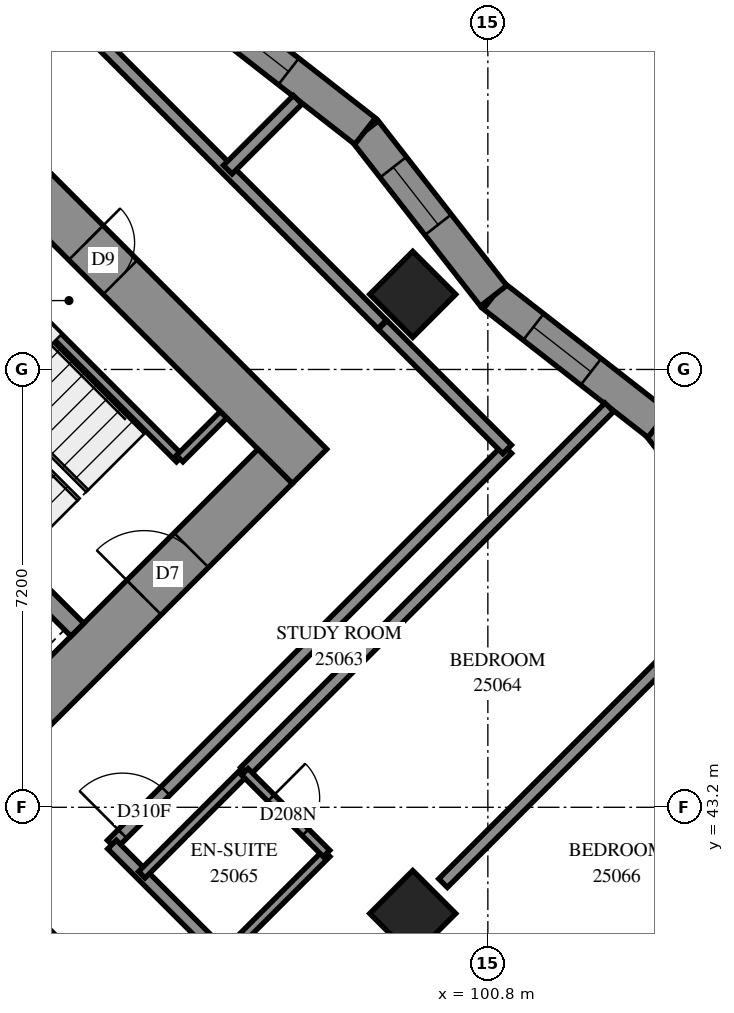
"""IFC4 building model, lengths in metres.
Left out: names, types, materials, properties, quantities, classifications, styles, units other than length and angle.
Written with IfcOpenShell. Run it as: python <this file> out.ifc"""

import sys

from ifc_helpers import new_model, si_unit, direction, frame, frame_2d, origin, origin_2d, place, context, subcontext, project, spatial, polyline, rectangle, outline, extrude, element, fill, save


model = new_model("IFC4")
c1 = context("Model", 3, precision=1e-05, world=origin(), true_north=direction((0.0, 1.0)))
c2 = subcontext(c1, "Body", "Model", "MODEL_VIEW")
j1 = project(units=[si_unit("LENGTHUNIT", "METRE"), si_unit("PLANEANGLEUNIT", "RADIAN")], contexts=[c1])
p1 = place(None, origin())
s1 = spatial("IfcSite", under=j1, at=p1, CompositionType="ELEMENT")
p2 = place(p1, origin())
s2 = spatial("IfcBuilding", under=s1, at=p2, CompositionType="ELEMENT")
p3 = place(p2, frame((0.0, 0.0, 94.8)))
s3 = spatial("IfcBuildingStorey", under=s2, at=p3, CompositionType="ELEMENT", Elevation=94.8)
for number, where, z_axis, x_axis in (
    (1, (99.565, 51.635, 0.0), (0.0, 0.0, 1.0), (0.707, -0.707, 0.0)),
    (2, (99.565, 41.453, 0.0), (0.0, 0.0, 1.0), (0.707, -0.707, 0.0)),
):
    element("IfcColumn", number, at=place(p3, frame(where, z_axis=z_axis, x_axis=x_axis)), inside=s3, PredefinedType="COLUMN", context=c2, shape_type="SweptSolid", body=[
        extrude(rectangle(XDim=1.0, YDim=1.0, at=origin_2d()), origin(), (0.0, 0.0, 1.0), 3.1),
    ])
p4 = place(p3, frame((86.554, 60.121, -0.3), z_axis=(0.0, 0.0, 1.0), x_axis=(0.7071067812, -0.7071067812, 0.0)))
e3 = element("IfcWall", 3, at=p4, inside=s3, PredefinedType="SHEAR", context=c2, shape_type="SweptSolid", body=[
    extrude(rectangle(XDim=16.0, YDim=0.8, at=frame_2d((8.0, 0.0))), origin(), (0.0, 0.0, 1.0), 2.7),
])
p5 = place(p4, frame((10.8, 0.0, 0.3)))
e4 = element("IfcOpeningElement", 4, at=p5, cuts=e3, PredefinedType="OPENING", context=c2, shape_type="SweptSolid", body=[
    extrude(rectangle(XDim=0.8, YDim=2.1, at=frame_2d((0.4, 1.05))), frame((0.0, 0.41, 0.0), z_axis=(0.0, -1.0, 0.0), x_axis=(1.0, 0.0, 0.0)), (0.0, 0.0, 1.0), 0.82),
])
p6 = place(p3, frame((87.12, 38.625, -0.3), z_axis=(0.0, 0.0, 1.0), x_axis=(0.7071067812, 0.7071067812, 0.0)))
e5 = element("IfcWall", 5, at=p6, inside=s3, PredefinedType="SHEAR", context=c2, shape_type="SweptSolid", body=[
    extrude(rectangle(XDim=14.4, YDim=0.8, at=frame_2d((7.2, 0.0))), origin(), (0.0, 0.0, 1.0), 2.7),
])
p7 = place(p6, frame((4.55, 0.0, 0.3)))
e6 = element("IfcOpeningElement", 6, at=p7, cuts=e5, PredefinedType="OPENING", context=c2, shape_type="SweptSolid", body=[
    extrude(rectangle(XDim=1.1, YDim=2.1, at=frame_2d((0.55, 1.05))), frame((0.0, 0.41, 0.0), z_axis=(0.0, -1.0, 0.0), x_axis=(1.0, 0.0, 0.0)), (0.0, 0.0, 1.0), 0.82),
])
p8 = place(p6, frame((11.35, 0.0, 0.3)))
e7 = element("IfcOpeningElement", 7, at=p8, cuts=e5, PredefinedType="OPENING", context=c2, shape_type="SweptSolid", body=[
    extrude(rectangle(XDim=1.1, YDim=2.1, at=frame_2d((0.55, 1.05))), frame((0.0, 0.41, 0.0), z_axis=(0.0, -1.0, 0.0), x_axis=(1.0, 0.0, 0.0)), (0.0, 0.0, 1.0), 0.82),
])
p9 = place(p3, frame((88.958, 51.211, 0.0), z_axis=(0.0, 0.0, 1.0), x_axis=(0.7070998367, -0.7071137256, 0.0)))
e8 = element("IfcWall", 8, at=p9, inside=s3, PredefinedType="SOLIDWALL", context=c2, shape_type="SweptSolid", body=[
    extrude(rectangle(XDim=7.2, YDim=0.3, at=frame_2d((3.6, 0.0))), origin(), (0.0, 0.0, 1.0), 3.1),
])
p10 = place(p3, frame((105.715, 46.791, 0.0), z_axis=(0.0, 0.0, 1.0), x_axis=(-0.6150788643, 0.7884655926, 0.0)))
e9 = element("IfcWall", 9, at=p10, inside=s3, PredefinedType="SOLIDWALL", context=c2, shape_type="SweptSolid", body=[
    extrude(outline(polyline([(0.034, -0.275), (3.468, -0.275), (3.401, 0.275), (-0.034, 0.275), (0.034, -0.275)])), origin(), (0.0, 0.0, 1.0), 3.1),
])
p11 = place(p10, frame((1.29, 0.0, 0.5)))
e10 = element("IfcOpeningElement", 10, at=p11, cuts=e9, PredefinedType="OPENING", context=c2, shape_type="SweptSolid", body=[
    extrude(rectangle(XDim=1.2, YDim=2.45, at=frame_2d((0.6, 1.225))), frame((0.0, 0.285, 0.0), z_axis=(0.0, -1.0, 0.0), x_axis=(1.0, 0.0, 0.0)), (0.0, 0.0, 1.0), 0.57),
])
p12 = place(p3, frame((103.602, 49.499, 0.0), z_axis=(0.0, 0.0, 1.0), x_axis=(-0.788454577, 0.6150929849, 0.0)))
e11 = element("IfcWall", 11, at=p12, inside=s3, PredefinedType="SOLIDWALL", context=c2, shape_type="SweptSolid", body=[
    extrude(outline(polyline([(-0.034, -0.275), (3.401, -0.275), (3.468, 0.275), (0.034, 0.275), (-0.034, -0.275)])), origin(), (0.0, 0.0, 1.0), 3.1),
])
p13 = place(p12, frame((1.403, 0.0, 0.5)))
e12 = element("IfcOpeningElement", 12, at=p13, cuts=e11, PredefinedType="OPENING", context=c2, shape_type="SweptSolid", body=[
    extrude(rectangle(XDim=1.2, YDim=2.45, at=frame_2d((0.6, 1.225))), frame((0.0, 0.285, 0.0), z_axis=(0.0, -1.0, 0.0), x_axis=(1.0, 0.0, 0.0)), (0.0, 0.0, 1.0), 0.57),
])
p14 = place(p3, frame((100.894, 51.611, 0.0), z_axis=(0.0, 0.0, 1.0), x_axis=(-0.6150929849, 0.788454577, 0.0)))
e13 = element("IfcWall", 13, at=p14, inside=s3, PredefinedType="SOLIDWALL", context=c2, shape_type="SweptSolid", body=[
    extrude(outline(polyline([(0.034, -0.275), (3.468, -0.275), (3.401, 0.275), (-0.034, 0.275), (0.034, -0.275)])), origin(), (0.0, 0.0, 1.0), 3.1),
])
p15 = place(p14, frame((1.482, 0.0, 0.5)))
e14 = element("IfcOpeningElement", 14, at=p15, cuts=e13, PredefinedType="OPENING", context=c2, shape_type="SweptSolid", body=[
    extrude(rectangle(XDim=1.2, YDim=2.45, at=frame_2d((0.6, 1.225))), frame((0.0, 0.285, 0.0), z_axis=(0.0, -1.0, 0.0), x_axis=(1.0, 0.0, 0.0)), (0.0, 0.0, 1.0), 0.57),
])
p16 = place(p3, frame((98.782, 54.319, 0.0), z_axis=(0.0, 0.0, 1.0), x_axis=(-0.7884655926, 0.6150788643, 0.0)))
e15 = element("IfcWall", 15, at=p16, inside=s3, PredefinedType="SOLIDWALL", context=c2, shape_type="SweptSolid", body=[
    extrude(outline(polyline([(-0.034, -0.275), (3.401, -0.275), (3.468, 0.275), (0.034, 0.275), (-0.034, -0.275)])), origin(), (0.0, 0.0, 1.0), 3.1),
])
p17 = place(p16, frame((1.596, 0.0, 0.5)))
e16 = element("IfcOpeningElement", 16, at=p17, cuts=e15, PredefinedType="OPENING", context=c2, shape_type="SweptSolid", body=[
    extrude(rectangle(XDim=1.2, YDim=2.45, at=frame_2d((0.6, 1.225))), frame((0.0, 0.285, 0.0), z_axis=(0.0, -1.0, 0.0), x_axis=(1.0, 0.0, 0.0)), (0.0, 0.0, 1.0), 0.57),
])
p18 = place(p3, frame((91.313, 53.354, 0.0), z_axis=(0.0, 0.0, 1.0), x_axis=(0.7071147811, -0.7070987812, 0.0)))
e17 = element("IfcWall", 17, at=p18, inside=s3, PredefinedType="PARTITIONING", context=c2, shape_type="SweptSolid", body=[
    extrude(rectangle(XDim=6.25, YDim=0.15, at=frame_2d((3.125, 0.0))), origin(), (0.0, 0.0, 1.0), 3.1),
])
p19 = place(p3, frame((95.732, 48.934, 0.0), z_axis=(0.0, 0.0, 1.0), x_axis=(0.7071067812, 0.7071067812, 0.0)))
e18 = element("IfcWall", 18, at=p19, inside=s3, PredefinedType="PARTITIONING", context=c2, shape_type="SweptSolid", body=[
    extrude(rectangle(XDim=1.02, YDim=0.15, at=frame_2d((0.51, 0.0))), origin(), (0.0, 0.0, 1.0), 3.1),
])
p20 = place(p3, frame((93.339, 41.309, 0.0), z_axis=(0.0, 0.0, 1.0), x_axis=(0.7071067812, -0.7071067812, 0.0)))
e19 = element("IfcWall", 19, at=p20, inside=s3, PredefinedType="PARTITIONING", context=c2, shape_type="SweptSolid", body=[
    extrude(rectangle(XDim=18.702, YDim=0.2, at=frame_2d((9.351, 0.0))), origin(), (0.0, 0.0, 1.0), 3.1),
])
p21 = place(p20, frame((3.05, 0.0, 0.0)))
e20 = element("IfcOpeningElement", 20, at=p21, cuts=e19, PredefinedType="OPENING", context=c2, shape_type="SweptSolid", body=[
    extrude(rectangle(XDim=0.9, YDim=2.1, at=frame_2d((0.45, 1.05))), frame((0.0, 0.11, 0.0), z_axis=(0.0, -1.0, 0.0), x_axis=(1.0, 0.0, 0.0)), (0.0, 0.0, 1.0), 0.22),
])
p22 = place(p20, frame((4.7, 0.0, 0.0)))
e21 = element("IfcOpeningElement", 21, at=p22, cuts=e19, PredefinedType="OPENING", context=c2, shape_type="SweptSolid", body=[
    extrude(rectangle(XDim=0.9, YDim=2.1, at=frame_2d((0.45, 1.05))), frame((0.0, 0.11, 0.0), z_axis=(0.0, -1.0, 0.0), x_axis=(1.0, 0.0, 0.0)), (0.0, 0.0, 1.0), 0.22),
])
p23 = place(p20, frame((10.149, 0.0, 0.0)))
e22 = element("IfcOpeningElement", 22, at=p23, cuts=e19, PredefinedType="OPENING", context=c2, shape_type="SweptSolid", body=[
    extrude(rectangle(XDim=0.9, YDim=2.1, at=frame_2d((0.45, 1.05))), frame((0.0, 0.11, 0.0), z_axis=(0.0, -1.0, 0.0), x_axis=(1.0, 0.0, 0.0)), (0.0, 0.0, 1.0), 0.22),
])
p24 = place(p20, frame((11.9, 0.0, 0.0)))
e23 = element("IfcOpeningElement", 23, at=p24, cuts=e19, PredefinedType="OPENING", context=c2, shape_type="SweptSolid", body=[
    extrude(rectangle(XDim=0.9, YDim=2.1, at=frame_2d((0.45, 1.05))), frame((0.0, 0.11, 0.0), z_axis=(0.0, -1.0, 0.0), x_axis=(1.0, 0.0, 0.0)), (0.0, 0.0, 1.0), 0.22),
])
p25 = place(p20, frame((17.45, 0.0, 0.0)))
e24 = element("IfcOpeningElement", 24, at=p25, cuts=e19, PredefinedType="OPENING", context=c2, shape_type="SweptSolid", body=[
    extrude(rectangle(XDim=0.9, YDim=2.1, at=frame_2d((0.45, 1.05))), frame((0.0, 0.11, 0.0), z_axis=(0.0, -1.0, 0.0), x_axis=(1.0, 0.0, 0.0)), (0.0, 0.0, 1.0), 0.22),
])
p26 = place(p3, frame((94.615, 42.587, 0.0), z_axis=(0.0, 0.0, 1.0), x_axis=(0.7071067812, 0.7071067812, 0.0)))
e25 = element("IfcWall", 25, at=p26, inside=s3, PredefinedType="PARTITIONING", context=c2, shape_type="SweptSolid", body=[
    extrude(rectangle(XDim=9.198, YDim=0.2, at=frame_2d((4.599, 0.0))), origin(), (0.0, 0.0, 1.0), 3.1),
])
p27 = place(p26, frame((0.248, 0.0, 0.0)))
e26 = element("IfcOpeningElement", 26, at=p27, cuts=e25, PredefinedType="OPENING", context=c2, shape_type="SweptSolid", body=[
    extrude(rectangle(XDim=1.0, YDim=2.1, at=frame_2d((0.5, 1.05))), frame((0.0, 0.11, 0.0), z_axis=(0.0, -1.0, 0.0), x_axis=(1.0, 0.0, 0.0)), (0.0, 0.0, 1.0), 0.22),
])
p28 = place(p3, frame((101.896, 38.698, 0.0), z_axis=(0.0, 0.0, 1.0), x_axis=(0.7072241589, 0.706989384, 0.0)))
e27 = element("IfcWall", 27, at=p28, inside=s3, PredefinedType="PARTITIONING", context=c2, shape_type="SweptSolid", body=[
    extrude(rectangle(XDim=8.519, YDim=0.2, at=frame_2d((4.259, 0.0))), origin(), (0.0, 0.0, 1.0), 3.1),
])
p29 = place(p3, frame((96.805, 43.787, 0.0), z_axis=(0.0, 0.0, 1.0), x_axis=(0.7071126822, 0.7071008801, 0.0)))
e28 = element("IfcWall", 28, at=p29, inside=s3, PredefinedType="PARTITIONING", context=c2, shape_type="SweptSolid", body=[
    extrude(rectangle(XDim=8.473, YDim=0.2, at=frame_2d((4.237, 0.0))), origin(), (0.0, 0.0, 1.0), 3.1),
])
p30 = place(p3, frame((94.62, 42.587, 0.0), z_axis=(0.0, 0.0, 1.0), x_axis=(0.7071067812, -0.7071067812, 0.0)))
e29 = element("IfcWall", 29, at=p30, inside=s3, PredefinedType="PARTITIONING", context=c2, shape_type="SweptSolid", body=[
    extrude(rectangle(XDim=7.9, YDim=0.2, at=frame_2d((3.95, 0.0))), origin(), (0.0, 0.0, 1.0), 3.1),
])
p31 = place(p30, frame((2.998, 0.0, 0.0)))
e30 = element("IfcOpeningElement", 30, at=p31, cuts=e29, PredefinedType="OPENING", context=c2, shape_type="SweptSolid", body=[
    extrude(rectangle(XDim=0.9, YDim=2.1, at=frame_2d((0.45, 1.05))), frame((0.0, 0.11, 0.0), z_axis=(0.0, -1.0, 0.0), x_axis=(1.0, 0.0, 0.0)), (0.0, 0.0, 1.0), 0.22),
])
p32 = place(p30, frame((4.649, 0.0, 0.0)))
e31 = element("IfcOpeningElement", 31, at=p32, cuts=e29, PredefinedType="OPENING", context=c2, shape_type="SweptSolid", body=[
    extrude(rectangle(XDim=0.9, YDim=2.1, at=frame_2d((0.45, 1.05))), frame((0.0, 0.11, 0.0), z_axis=(0.0, -1.0, 0.0), x_axis=(1.0, 0.0, 0.0)), (0.0, 0.0, 1.0), 0.22),
])
p33 = place(p3, frame((93.981, 56.223, 0.0), z_axis=(0.0, 0.0, 1.0), x_axis=(0.7071067812, -0.7071067812, 0.0)))
e32 = element("IfcWall", 32, at=p33, inside=s3, PredefinedType="PARTITIONING", context=c2, shape_type="SweptSolid", body=[
    extrude(rectangle(XDim=7.184, YDim=0.2, at=frame_2d((3.592, 0.0))), origin(), (0.0, 0.0, 1.0), 3.1),
])
p34 = place(p3, frame((100.063, 41.953, 0.0), z_axis=(0.0, 0.0, 1.0), x_axis=(0.7071067812, 0.7071067812, 0.0)))
e33 = element("IfcWall", 33, at=p34, inside=s3, PredefinedType="PARTITIONING", context=c2, shape_type="SweptSolid", body=[
    extrude(rectangle(XDim=5.787, YDim=0.2, at=frame_2d((2.893, 0.0))), origin(), (0.0, 0.0, 1.0), 3.1),
])
p35 = place(p3, frame((99.071, 51.133, 0.0), z_axis=(0.0, 0.0, 1.0), x_axis=(0.7071067812, -0.7071067812, 0.0)))
e34 = element("IfcWall", 34, at=p35, inside=s3, PredefinedType="PARTITIONING", context=c2, shape_type="SweptSolid", body=[
    extrude(rectangle(XDim=2.893, YDim=0.2, at=frame_2d((1.447, 0.0))), origin(), (0.0, 0.0, 1.0), 3.1),
])
for number, where, z_axis, x_axis in (
    (35, (96.453, 40.747, 0.0), (0.0, 0.0, 1.0), (0.707, 0.707, 0.0)),
    (36, (95.109, 42.091, 0.0), (0.0, 0.0, 1.0), (0.707, 0.707, 0.0)),
):
    element("IfcWall", number, at=place(p3, frame(where, z_axis=z_axis, x_axis=x_axis)), inside=s3, PredefinedType="PARTITIONING", context=c2, shape_type="SweptSolid", body=[
        extrude(rectangle(XDim=2.398, YDim=0.15, at=frame_2d((1.199, 0.0))), origin(), (0.0, 0.0, 1.0), 3.1),
    ])
p36 = place(p3, frame((96.803, 43.783, 0.0), z_axis=(0.0, 0.0, 1.0), x_axis=(0.7071067812, -0.7071067812, 0.0)))
e37 = element("IfcWall", 37, at=p36, inside=s3, PredefinedType="PARTITIONING", context=c2, shape_type="SweptSolid", body=[
    extrude(rectangle(XDim=1.901, YDim=0.15, at=frame_2d((0.95, 0.0))), origin(), (0.0, 0.0, 1.0), 3.1),
])
p37 = place(p36, frame((0.609, 0.0, 0.0)))
e38 = element("IfcOpeningElement", 38, at=p37, cuts=e37, PredefinedType="OPENING", context=c2, shape_type="SweptSolid", body=[
    extrude(rectangle(XDim=0.8, YDim=2.1, at=frame_2d((0.4, 1.05))), frame((0.0, 0.085, 0.0), z_axis=(0.0, -1.0, 0.0), x_axis=(1.0, 0.0, 0.0)), (0.0, 0.0, 1.0), 0.17),
])
p38 = place(p3, frame((96.523, 53.687, 0.0), z_axis=(0.0, 0.0, 1.0), x_axis=(0.7070760086, 0.7071375524, 0.0)))
e39 = element("IfcWall", 39, at=p38, inside=s3, PredefinedType="PARTITIONING", context=c2, shape_type="SweptSolid", body=[
    extrude(rectangle(XDim=1.625, YDim=0.2, at=frame_2d((0.812, 0.0))), origin(), (0.0, 0.0, 1.0), 3.1),
])
p39 = place(p13, origin())
e40 = element("IfcWindow", 40, at=p39, inside=s3, PartitioningType="SINGLE_PANEL", PredefinedType="WINDOW", context=c2, shape_type="SweptSolid", body=[
    extrude(rectangle(XDim=1.2, YDim=2.45, at=frame_2d((0.6, 1.225))), frame((0.0, 0.155, 0.0), z_axis=(0.0, -1.0, 0.0), x_axis=(1.0, 0.0, 0.0)), (0.0, 0.0, 1.0), 0.06),
])
fill(e12, e40)
p40 = place(p15, origin())
e41 = element("IfcWindow", 41, at=p40, inside=s3, PartitioningType="SINGLE_PANEL", PredefinedType="WINDOW", context=c2, shape_type="SweptSolid", body=[
    extrude(rectangle(XDim=1.2, YDim=2.45, at=frame_2d((0.6, 1.225))), frame((0.0, 0.155, 0.0), z_axis=(0.0, -1.0, 0.0), x_axis=(1.0, 0.0, 0.0)), (0.0, 0.0, 1.0), 0.06),
])
fill(e14, e41)
p41 = place(p17, origin())
e42 = element("IfcWindow", 42, at=p41, inside=s3, PartitioningType="SINGLE_PANEL", PredefinedType="WINDOW", context=c2, shape_type="SweptSolid", body=[
    extrude(rectangle(XDim=1.2, YDim=2.45, at=frame_2d((0.6, 1.225))), frame((0.0, 0.155, 0.0), z_axis=(0.0, -1.0, 0.0), x_axis=(1.0, 0.0, 0.0)), (0.0, 0.0, 1.0), 0.06),
])
fill(e16, e42)
p42 = place(p5, origin())
e43 = element("IfcDoor", 43, at=p42, inside=s3, OperationType="SINGLE_SWING_RIGHT", PredefinedType="DOOR", context=c2, shape_type="SweptSolid", body=[
    extrude(rectangle(XDim=0.8, YDim=2.1, at=frame_2d((0.4, 1.05))), frame((0.0, -0.34, 0.0), z_axis=(0.0, -1.0, 0.0), x_axis=(1.0, 0.0, 0.0)), (0.0, 0.0, 1.0), 0.05),
])
fill(e4, e43)
p43 = place(p8, origin())
e44 = element("IfcDoor", 44, at=p43, inside=s3, OperationType="SINGLE_SWING_RIGHT", PredefinedType="DOOR", context=c2, shape_type="SweptSolid", body=[
    extrude(rectangle(XDim=1.1, YDim=2.1, at=frame_2d((0.55, 1.05))), frame((0.0, 0.025, 0.0), z_axis=(0.0, -1.0, 0.0), x_axis=(1.0, 0.0, 0.0)), (0.0, 0.0, 1.0), 0.05),
])
fill(e7, e44)
p44 = place(p27, origin())
e45 = element("IfcDoor", 45, at=p44, inside=s3, OperationType="SINGLE_SWING_RIGHT", PredefinedType="DOOR", context=c2, shape_type="SweptSolid", body=[
    extrude(rectangle(XDim=1.0, YDim=2.1, at=frame_2d((0.5, 1.05))), frame((0.0, 0.025, 0.0), z_axis=(0.0, -1.0, 0.0), x_axis=(1.0, 0.0, 0.0)), (0.0, 0.0, 1.0), 0.05),
])
fill(e26, e45)
p45 = place(p37, origin())
e46 = element("IfcDoor", 46, at=p45, inside=s3, OperationType="SINGLE_SWING_RIGHT", PredefinedType="DOOR", context=c2, shape_type="SweptSolid", body=[
    extrude(rectangle(XDim=0.8, YDim=2.1, at=frame_2d((0.4, 1.05))), frame((0.0, 0.025, 0.0), z_axis=(0.0, -1.0, 0.0), x_axis=(1.0, 0.0, 0.0)), (0.0, 0.0, 1.0), 0.05),
])
fill(e38, e46)
save(model, sys.argv[1])
